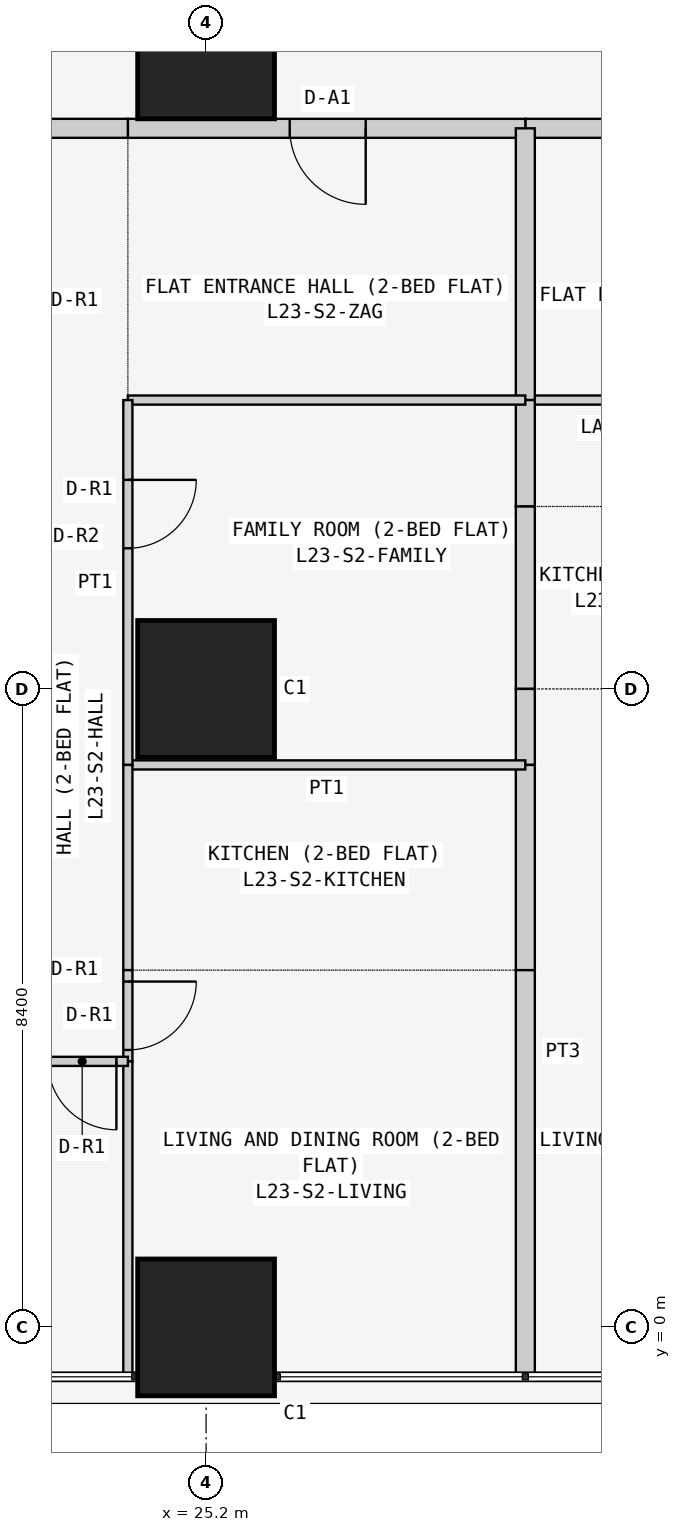
"""IFC4 building model, lengths in metres.
Left out: names, types, materials, properties, quantities, classifications, styles, units other than length and angle.
Written with IfcOpenShell. Run it as: python <this file> out.ifc"""

import sys

from ifc_helpers import new_model, si_unit, direction, frame, frame_2d, origin, origin_2d, place, context, subcontext, project, spatial, rectangle, extrude, element, fill, save


model = new_model("IFC4")
c1 = context("Model", 3, precision=1e-05, world=origin(), true_north=direction((0.0, 1.0)))
c2 = subcontext(c1, "Body", "Model", "MODEL_VIEW")
j1 = project(units=[si_unit("LENGTHUNIT", "METRE"), si_unit("PLANEANGLEUNIT", "RADIAN")], contexts=[c1])
p1 = place(None, origin())
s1 = spatial("IfcSite", under=j1, at=p1, CompositionType="ELEMENT")
p2 = place(p1, origin())
s2 = spatial("IfcBuilding", under=s1, at=p2, CompositionType="ELEMENT")
p3 = place(p2, frame((0.0, 0.0, 92.1)))
s3 = spatial("IfcBuildingStorey", under=s2, at=p3, CompositionType="ELEMENT", Elevation=92.1)
for number, where, z_axis, x_axis in (
    (1, (25.2, 0.0, 0.0), (0.0, 0.0, 1.0), (1.0, 0.0, 0.0)),
    (2, (25.2, 8.4, 0.0), (0.0, 0.0, 1.0), (1.0, 0.0, 0.0)),
    (3, (25.2, 16.8, 0.0), (0.0, 0.0, 1.0), (1.0, 0.0, 0.0)),
):
    element("IfcColumn", number, at=place(p3, frame(where, z_axis=z_axis, x_axis=x_axis)), inside=s3, PredefinedType="COLUMN", context=c2, shape_type="SweptSolid", body=[
        extrude(rectangle(XDim=1.8, YDim=1.8, at=origin_2d()), origin(), (0.0, 0.0, 1.0), 3.6),
    ])
p4 = place(p3, frame((34.629, 15.775, 0.0), z_axis=(0.0, 0.0, 1.0), x_axis=(-1.0, 0.0, 0.0)))
e4 = element("IfcWall", 4, at=p4, inside=s3, PredefinedType="PARTITIONING", context=c2, shape_type="SweptSolid", body=[
    extrude(rectangle(XDim=5.229, YDim=0.25, at=frame_2d((2.615, 0.0))), origin(), (0.0, 0.0, 1.0), 3.45),
])
p5 = place(p4, frame((2.129, 0.0, 0.0)))
e5 = element("IfcOpeningElement", 5, at=p5, cuts=e4, PredefinedType="OPENING", context=c2, shape_type="SweptSolid", body=[
    extrude(rectangle(XDim=1.0, YDim=2.1, at=frame_2d((0.5, 1.05))), frame((0.0, 0.135, 0.0), z_axis=(0.0, -1.0, 0.0), x_axis=(1.0, 0.0, 0.0)), (0.0, 0.0, 1.0), 0.27),
])
p6 = place(p3, frame((29.4, 15.775, 0.0), z_axis=(0.0, 0.0, 1.0), x_axis=(-1.0, 0.0, 0.0)))
e6 = element("IfcWall", 6, at=p6, inside=s3, PredefinedType="PARTITIONING", context=c2, shape_type="SweptSolid", body=[
    extrude(rectangle(XDim=5.229, YDim=0.25, at=frame_2d((2.615, 0.0))), origin(), (0.0, 0.0, 1.0), 3.45),
])
p7 = place(p6, frame((2.1, 0.0, 0.0)))
e7 = element("IfcOpeningElement", 7, at=p7, cuts=e6, PredefinedType="OPENING", context=c2, shape_type="SweptSolid", body=[
    extrude(rectangle(XDim=1.0, YDim=2.1, at=frame_2d((0.5, 1.05))), frame((0.0, 0.135, 0.0), z_axis=(0.0, -1.0, 0.0), x_axis=(1.0, 0.0, 0.0)), (0.0, 0.0, 1.0), 0.27),
])
p8 = place(p3, frame((24.171, 15.775, 0.0), z_axis=(0.0, 0.0, 1.0), x_axis=(-1.0, 0.0, 0.0)))
e8 = element("IfcWall", 8, at=p8, inside=s3, PredefinedType="PARTITIONING", context=c2, shape_type="SweptSolid", body=[
    extrude(rectangle(XDim=1.2, YDim=0.25, at=frame_2d((0.6, 0.0))), origin(), (0.0, 0.0, 1.0), 3.45),
])
p9 = place(p3, frame((29.4, 12.2, 0.0), z_axis=(0.0, 0.0, 1.0), x_axis=(1.0, 0.0, 0.0)))
e9 = element("IfcWall", 9, at=p9, inside=s3, PredefinedType="PARTITIONING", context=c2, shape_type="SweptSolid", body=[
    extrude(rectangle(XDim=5.229, YDim=0.12, at=frame_2d((2.615, 0.0))), origin(), (0.0, 0.0, 1.0), 3.45),
])
p10 = place(p3, frame((29.4, 15.775, 0.0), z_axis=(0.0, 0.0, 1.0), x_axis=(0.0, -1.0, 0.0)))
e10 = element("IfcWall", 10, at=p10, inside=s3, PredefinedType="PARTITIONING", context=c2, shape_type="SweptSolid", body=[
    extrude(rectangle(XDim=3.575, YDim=0.25, at=frame_2d((1.788, 0.0))), origin(), (0.0, 0.0, 1.0), 2.848),
])
p11 = place(p3, frame((29.4, 12.2, 0.0), z_axis=(0.0, 0.0, 1.0), x_axis=(0.0, -1.0, 0.0)))
e11 = element("IfcWall", 11, at=p11, inside=s3, PredefinedType="PARTITIONING", context=c2, shape_type="SweptSolid", body=[
    extrude(rectangle(XDim=1.4, YDim=0.25, at=frame_2d((0.7, 0.0))), origin(), (0.0, 0.0, 1.0), 2.848),
])
p12 = place(p3, frame((29.4, 10.8, 0.0), z_axis=(0.0, 0.0, 1.0), x_axis=(0.0, -1.0, 0.0)))
e12 = element("IfcWall", 12, at=p12, inside=s3, PredefinedType="PARTITIONING", context=c2, shape_type="SweptSolid", body=[
    extrude(rectangle(XDim=2.4, YDim=0.25, at=frame_2d((1.2, 0.0))), origin(), (0.0, 0.0, 1.0), 2.848),
])
p13 = place(p3, frame((29.4, 8.4, 0.0), z_axis=(0.0, 0.0, 1.0), x_axis=(0.0, -1.0, 0.0)))
e13 = element("IfcWall", 13, at=p13, inside=s3, PredefinedType="PARTITIONING", context=c2, shape_type="SweptSolid", body=[
    extrude(rectangle(XDim=1.0, YDim=0.25, at=frame_2d((0.5, 0.0))), origin(), (0.0, 0.0, 1.0), 2.848),
])
p14 = place(p3, frame((29.4, 7.4, 0.0), z_axis=(0.0, 0.0, 1.0), x_axis=(0.0, -1.0, 0.0)))
e14 = element("IfcWall", 14, at=p14, inside=s3, PredefinedType="PARTITIONING", context=c2, shape_type="SweptSolid", body=[
    extrude(rectangle(XDim=2.7, YDim=0.25, at=frame_2d((1.35, 0.0))), origin(), (0.0, 0.0, 1.0), 2.848),
])
p15 = place(p3, frame((29.4, 4.7, 0.0), z_axis=(0.0, 0.0, 1.0), x_axis=(0.0, -1.0, 0.0)))
e15 = element("IfcWall", 15, at=p15, inside=s3, PredefinedType="PARTITIONING", context=c2, shape_type="SweptSolid", body=[
    extrude(rectangle(XDim=5.35, YDim=0.25, at=frame_2d((2.675, 0.0))), origin(), (0.0, 0.0, 1.0), 2.848),
])
for number, where, z_axis, x_axis in (
    (16, (29.4, 12.2, 0.0), (0.0, 0.0, 1.0), (-1.0, 0.0, 0.0)),
    (17, (29.4, 7.4, 0.0), (0.0, 0.0, 1.0), (-1.0, 0.0, 0.0)),
):
    element("IfcWall", number, at=place(p3, frame(where, z_axis=z_axis, x_axis=x_axis)), inside=s3, PredefinedType="PARTITIONING", context=c2, shape_type="SweptSolid", body=[
        extrude(rectangle(XDim=5.229, YDim=0.12, at=frame_2d((2.615, 0.0))), origin(), (0.0, 0.0, 1.0), 3.45),
    ])
p16 = place(p3, frame((24.171, 7.4, 0.0), z_axis=(0.0, 0.0, 1.0), x_axis=(0.0, 1.0, 0.0)))
e18 = element("IfcWall", 18, at=p16, inside=s3, PredefinedType="PARTITIONING", context=c2, shape_type="SweptSolid", body=[
    extrude(rectangle(XDim=4.8, YDim=0.12, at=frame_2d((2.4, 0.0))), origin(), (0.0, 0.0, 1.0), 3.45),
])
p17 = place(p16, frame((2.85, 0.0, 0.0)))
e19 = element("IfcOpeningElement", 19, at=p17, cuts=e18, PredefinedType="OPENING", context=c2, shape_type="SweptSolid", body=[
    extrude(rectangle(XDim=0.9, YDim=2.1, at=frame_2d((0.45, 1.05))), frame((0.0, 0.07, 0.0), z_axis=(0.0, -1.0, 0.0), x_axis=(1.0, 0.0, 0.0)), (0.0, 0.0, 1.0), 0.14),
])
p18 = place(p3, frame((24.171, 4.7, 0.0), z_axis=(0.0, 0.0, 1.0), x_axis=(0.0, 1.0, 0.0)))
e20 = element("IfcWall", 20, at=p18, inside=s3, PredefinedType="PARTITIONING", context=c2, shape_type="SweptSolid", body=[
    extrude(rectangle(XDim=2.7, YDim=0.12, at=frame_2d((1.35, 0.0))), origin(), (0.0, 0.0, 1.0), 3.45),
])
p19 = place(p3, frame((24.171, 3.5, 0.0), z_axis=(0.0, 0.0, 1.0), x_axis=(0.0, 1.0, 0.0)))
e21 = element("IfcWall", 21, at=p19, inside=s3, PredefinedType="PARTITIONING", context=c2, shape_type="SweptSolid", body=[
    extrude(rectangle(XDim=1.2, YDim=0.12, at=frame_2d((0.6, 0.0))), origin(), (0.0, 0.0, 1.0), 3.45),
])
p20 = place(p19, frame((0.15, 0.0, 0.0)))
e22 = element("IfcOpeningElement", 22, at=p20, cuts=e21, PredefinedType="OPENING", context=c2, shape_type="SweptSolid", body=[
    extrude(rectangle(XDim=0.9, YDim=2.1, at=frame_2d((0.45, 1.05))), frame((0.0, 0.07, 0.0), z_axis=(0.0, -1.0, 0.0), x_axis=(1.0, 0.0, 0.0)), (0.0, 0.0, 1.0), 0.14),
])
p21 = place(p3, frame((24.171, -0.65, 0.0), z_axis=(0.0, 0.0, 1.0), x_axis=(0.0, 1.0, 0.0)))
e23 = element("IfcWall", 23, at=p21, inside=s3, PredefinedType="PARTITIONING", context=c2, shape_type="SweptSolid", body=[
    extrude(rectangle(XDim=4.15, YDim=0.12, at=frame_2d((2.075, 0.0))), origin(), (0.0, 0.0, 1.0), 3.45),
])
p22 = place(p3, frame((24.171, 3.5, 0.0), z_axis=(0.0, 0.0, 1.0), x_axis=(-1.0, 0.0, 0.0)))
e24 = element("IfcWall", 24, at=p22, inside=s3, PredefinedType="PARTITIONING", context=c2, shape_type="SweptSolid", body=[
    extrude(rectangle(XDim=1.2, YDim=0.12, at=frame_2d((0.6, 0.0))), origin(), (0.0, 0.0, 1.0), 3.45),
])
p23 = place(p22, frame((0.151, 0.0, 0.0)))
e25 = element("IfcOpeningElement", 25, at=p23, cuts=e24, PredefinedType="OPENING", context=c2, shape_type="SweptSolid", body=[
    extrude(rectangle(XDim=0.9, YDim=2.1, at=frame_2d((0.45, 1.05))), frame((0.0, 0.07, 0.0), z_axis=(0.0, -1.0, 0.0), x_axis=(1.0, 0.0, 0.0)), (0.0, 0.0, 1.0), 0.14),
])
p24 = place(p7, origin())
e26 = element("IfcDoor", 26, at=p24, inside=s3, OperationType="SINGLE_SWING_LEFT", PredefinedType="DOOR", context=c2, shape_type="SweptSolid", body=[
    extrude(rectangle(XDim=1.0, YDim=2.1, at=frame_2d((0.5, 1.05))), frame((0.0, 0.025, 0.0), z_axis=(0.0, -1.0, 0.0), x_axis=(1.0, 0.0, 0.0)), (0.0, 0.0, 1.0), 0.05),
])
fill(e7, e26)
p25 = place(p17, frame((0.9, 0.0, 0.0), z_axis=(0.0, 0.0, 1.0), x_axis=(-1.0, 0.0, 0.0)))
e27 = element("IfcDoor", 27, at=p25, inside=s3, OperationType="SINGLE_SWING_LEFT", PredefinedType="DOOR", context=c2, shape_type="SweptSolid", body=[
    extrude(rectangle(XDim=0.9, YDim=2.1, at=frame_2d((0.45, 1.05))), frame((0.0, 0.025, 0.0), z_axis=(0.0, -1.0, 0.0), x_axis=(1.0, 0.0, 0.0)), (0.0, 0.0, 1.0), 0.05),
])
fill(e19, e27)
p26 = place(p20, frame((0.9, 0.0, 0.0), z_axis=(0.0, 0.0, 1.0), x_axis=(-1.0, 0.0, 0.0)))
e28 = element("IfcDoor", 28, at=p26, inside=s3, OperationType="SINGLE_SWING_LEFT", PredefinedType="DOOR", context=c2, shape_type="SweptSolid", body=[
    extrude(rectangle(XDim=0.9, YDim=2.1, at=frame_2d((0.45, 1.05))), frame((0.0, 0.025, 0.0), z_axis=(0.0, -1.0, 0.0), x_axis=(1.0, 0.0, 0.0)), (0.0, 0.0, 1.0), 0.05),
])
fill(e22, e28)
p27 = place(p23, origin())
e29 = element("IfcDoor", 29, at=p27, inside=s3, OperationType="SINGLE_SWING_LEFT", PredefinedType="DOOR", context=c2, shape_type="SweptSolid", body=[
    extrude(rectangle(XDim=0.9, YDim=2.1, at=frame_2d((0.45, 1.05))), frame((0.0, 0.025, 0.0), z_axis=(0.0, -1.0, 0.0), x_axis=(1.0, 0.0, 0.0)), (0.0, 0.0, 1.0), 0.05),
])
fill(e25, e29)
save(model, sys.argv[1])
